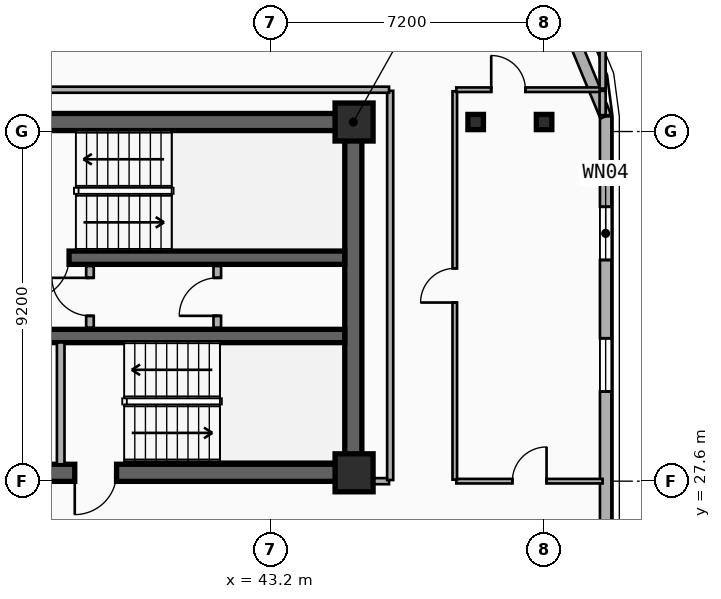
"""IFC4 building model, lengths in metres.
Left out: names, types, materials, properties, quantities, classifications, styles, units other than length and angle.
Written with IfcOpenShell. Run it as: python <this file> out.ifc"""

import sys

from ifc_helpers import new_model, si_unit, direction, frame, frame_2d, origin, origin_2d, place, context, subcontext, project, spatial, rectangle, i_section, extrude, element, fill, save


model = new_model("IFC4")
c1 = context("Model", 3, precision=1e-05, world=origin(), true_north=direction((0.0, 1.0)))
c2 = subcontext(c1, "Body", "Model", "MODEL_VIEW")
j1 = project(units=[si_unit("LENGTHUNIT", "METRE"), si_unit("PLANEANGLEUNIT", "RADIAN")], contexts=[c1])
p1 = place(None, origin())
s1 = spatial("IfcSite", under=j1, at=p1, CompositionType="ELEMENT")
p2 = place(p1, origin())
s2 = spatial("IfcBuilding", under=s1, at=p2, CompositionType="ELEMENT")
p3 = place(p2, frame((0.0, 0.0, 229.2)))
s3 = spatial("IfcBuildingStorey", under=s2, at=p3, CompositionType="ELEMENT", Elevation=229.2)
p4 = place(p3, frame((12.15, 37.05, 0.0), z_axis=(0.0, 0.0, 1.0), x_axis=(1.0, 0.0, 0.0)))
e1 = element("IfcWall", 1, at=p4, inside=s3, PredefinedType="SHEAR", context=c2, shape_type="SweptSolid", body=[
    extrude(rectangle(XDim=33.23, YDim=0.45, at=frame_2d((16.615, 0.0))), origin(), (0.0, 0.0, 1.0), 3.6),
])
p5 = place(p3, frame((45.38, 27.82, 0.0), z_axis=(0.0, 0.0, 1.0), x_axis=(-1.0, 0.0, 0.0)))
e2 = element("IfcWall", 2, at=p5, inside=s3, PredefinedType="SHEAR", context=c2, shape_type="SweptSolid", body=[
    extrude(rectangle(XDim=12.23, YDim=0.45, at=frame_2d((6.115, 0.0))), origin(), (0.0, 0.0, 1.0), 3.6),
])
p6 = place(p5, frame((9.93, 0.0, 0.0)))
e3 = element("IfcOpeningElement", 3, at=p6, cuts=e2, PredefinedType="OPENING", context=c2, shape_type="SweptSolid", body=[
    extrude(rectangle(XDim=1.1, YDim=2.15, at=frame_2d((0.55, 1.075))), frame((0.0, 0.235, 0.0), z_axis=(0.0, -1.0, 0.0), x_axis=(1.0, 0.0, 0.0)), (0.0, 0.0, 1.0), 0.47),
])
p7 = place(p5, frame((6.23, 0.0, 0.0)))
e4 = element("IfcOpeningElement", 4, at=p7, cuts=e2, PredefinedType="OPENING", context=c2, shape_type="SweptSolid", body=[
    extrude(rectangle(XDim=1.1, YDim=2.15, at=frame_2d((0.55, 1.075))), frame((0.0, 0.235, 0.0), z_axis=(0.0, -1.0, 0.0), x_axis=(1.0, 0.0, 0.0)), (0.0, 0.0, 1.0), 0.47),
])
p8 = place(p3, frame((45.38, 28.045, 0.0), z_axis=(0.0, 0.0, 1.0), x_axis=(0.0, 1.0, 0.0)))
e5 = element("IfcWall", 5, at=p8, inside=s3, PredefinedType="SHEAR", context=c2, shape_type="SweptSolid", body=[
    extrude(rectangle(XDim=8.78, YDim=0.45, at=frame_2d((4.39, 0.0))), origin(), (0.0, 0.0, 1.0), 3.6),
])
p9 = place(p3, frame((45.155, 33.48, 0.0), z_axis=(0.0, 0.0, 1.0), x_axis=(-1.0, 0.0, 0.0)))
e6 = element("IfcWall", 6, at=p9, inside=s3, PredefinedType="SHEAR", context=c2, shape_type="SweptSolid", body=[
    extrude(rectangle(XDim=8.6, YDim=0.35, at=frame_2d((4.3, 0.0))), origin(), (0.0, 0.0, 1.0), 3.6),
])
p10 = place(p9, frame((7.255, 0.0, 0.0)))
e7 = element("IfcOpeningElement", 7, at=p10, cuts=e6, PredefinedType="OPENING", context=c2, shape_type="SweptSolid", body=[
    extrude(rectangle(XDim=1.1, YDim=2.15, at=frame_2d((0.55, 1.075))), frame((0.0, 0.185, 0.0), z_axis=(0.0, -1.0, 0.0), x_axis=(1.0, 0.0, 0.0)), (0.0, 0.0, 1.0), 0.37),
])
p11 = place(p3, frame((36.555, 31.42, 0.0), z_axis=(0.0, 0.0, 1.0), x_axis=(1.0, 0.0, 0.0)))
e8 = element("IfcWall", 8, at=p11, inside=s3, PredefinedType="SHEAR", context=c2, shape_type="SweptSolid", body=[
    extrude(rectangle(XDim=8.6, YDim=0.35, at=frame_2d((4.3, 0.0))), origin(), (0.0, 0.0, 1.0), 3.6),
])
for number, where, z_axis, x_axis in (
    (9, (45.4, 27.82, 0.0), (0.0, 0.0, 1.0), (1.0, 0.0, 0.0)),
    (10, (45.4, 37.05, 0.0), (0.0, 0.0, 1.0), (1.0, 0.0, 0.0)),
):
    element("IfcColumn", number, at=place(p3, frame(where, z_axis=z_axis, x_axis=x_axis)), inside=s3, PredefinedType="COLUMN", context=c2, shape_type="SweptSolid", body=[
        extrude(rectangle(XDim=1.0, YDim=1.0, at=origin_2d()), origin(), (0.0, 0.0, 1.0), 3.6),
    ])
for number, where, z_axis, x_axis in (
    (11, (48.6, 37.05, 0.0), (0.0, 0.0, 1.0), (1.0, 0.0, 0.0)),
    (12, (50.4, 37.05, 0.0), (0.0, 0.0, 1.0), (1.0, 0.0, 0.0)),
):
    element("IfcColumn", number, at=place(p3, frame(where, z_axis=z_axis, x_axis=x_axis)), inside=s3, PredefinedType="COLUMN", context=c2, shape_type="SweptSolid", body=[
        extrude(i_section(OverallWidth=0.408, OverallDepth=0.4, WebThickness=0.025, FlangeThickness=0.039, FilletRadius=0.015, at=origin_2d()), origin(), (0.0, 0.0, 1.0), 3.6),
    ])
p12 = place(p3, frame((52.02, 37.2, 0.0), z_axis=(0.0, 0.0, 1.0), x_axis=(0.0, -1.0, 0.0)))
e13 = element("IfcWall", 13, at=p12, inside=s3, PredefinedType="SOLIDWALL", context=c2, shape_type="SweptSolid", body=[
    extrude(rectangle(XDim=28.6, YDim=0.3, at=frame_2d((14.3, 0.0))), origin(), (0.0, 0.0, 1.0), 3.34),
])
p13 = place(p12, frame((2.38, 0.0, 0.34)))
e14 = element("IfcOpeningElement", 14, at=p13, cuts=e13, PredefinedType="OPENING", context=c2, shape_type="SweptSolid", body=[
    extrude(rectangle(XDim=1.4, YDim=2.1, at=frame_2d((0.7, 1.05))), frame((0.0, 0.16, 0.0), z_axis=(0.0, -1.0, 0.0), x_axis=(1.0, 0.0, 0.0)), (0.0, 0.0, 1.0), 0.32),
])
p14 = place(p12, frame((5.84, 0.0, 0.34)))
e15 = element("IfcOpeningElement", 15, at=p14, cuts=e13, PredefinedType="OPENING", context=c2, shape_type="SweptSolid", body=[
    extrude(rectangle(XDim=1.4, YDim=2.1, at=frame_2d((0.7, 1.05))), frame((0.0, 0.16, 0.0), z_axis=(0.0, -1.0, 0.0), x_axis=(1.0, 0.0, 0.0)), (0.0, 0.0, 1.0), 0.32),
])
p15 = place(p12, frame((24.529, 0.0, 0.34)))
e16 = element("IfcOpeningElement", 16, at=p15, cuts=e13, PredefinedType="OPENING", context=c2, shape_type="SweptSolid", body=[
    extrude(rectangle(XDim=1.4, YDim=2.1, at=frame_2d((0.7, 1.05))), frame((0.0, 0.16, 0.0), z_axis=(0.0, -1.0, 0.0), x_axis=(1.0, 0.0, 0.0)), (0.0, 0.0, 1.0), 0.32),
])
p16 = place(p12, frame((20.521, 0.0, 0.34)))
e17 = element("IfcOpeningElement", 17, at=p16, cuts=e13, PredefinedType="OPENING", context=c2, shape_type="SweptSolid", body=[
    extrude(rectangle(XDim=1.4, YDim=2.1, at=frame_2d((0.7, 1.05))), frame((0.0, 0.16, 0.0), z_axis=(0.0, -1.0, 0.0), x_axis=(1.0, 0.0, 0.0)), (0.0, 0.0, 1.0), 0.32),
])
p17 = place(p12, frame((16.733, 0.0, 0.34)))
e18 = element("IfcOpeningElement", 18, at=p17, cuts=e13, PredefinedType="OPENING", context=c2, shape_type="SweptSolid", body=[
    extrude(rectangle(XDim=1.4, YDim=2.1, at=frame_2d((0.7, 1.05))), frame((0.0, 0.16, 0.0), z_axis=(0.0, -1.0, 0.0), x_axis=(1.0, 0.0, 0.0)), (0.0, 0.0, 1.0), 0.32),
])
p18 = place(p12, frame((12.945, 0.0, 0.34)))
e19 = element("IfcOpeningElement", 19, at=p18, cuts=e13, PredefinedType="OPENING", context=c2, shape_type="SweptSolid", body=[
    extrude(rectangle(XDim=1.4, YDim=2.1, at=frame_2d((0.7, 1.05))), frame((0.0, 0.16, 0.0), z_axis=(0.0, -1.0, 0.0), x_axis=(1.0, 0.0, 0.0)), (0.0, 0.0, 1.0), 0.32),
])
p19 = place(p3, frame((50.843, 40.042, 0.0), z_axis=(0.0, 0.0, 1.0), x_axis=(0.382704529509, -0.923870793506, 0.0)))
e20 = element("IfcWall", 20, at=p19, inside=s3, PredefinedType="SOLIDWALL", context=c2, shape_type="SweptSolid", body=[
    extrude(rectangle(XDim=3.077, YDim=0.3, at=frame_2d((1.538, 0.0))), origin(), (0.0, 0.0, 1.0), 3.34),
])
p20 = place(p3, frame((37.68, 28.045, 0.0), z_axis=(0.0, 0.0, 1.0), x_axis=(0.0, 1.0, 0.0)))
e21 = element("IfcWall", 21, at=p20, inside=s3, PredefinedType="PARTITIONING", context=c2, shape_type="SweptSolid", body=[
    extrude(rectangle(XDim=3.205, YDim=0.2, at=frame_2d((1.603, 0.0))), origin(), (0.0, 0.0, 1.0), 2.72),
])
p21 = place(p3, frame((38.45, 31.64, 0.0), z_axis=(0.0, 0.0, 1.0), x_axis=(0.0, 1.0, 0.0)))
e22 = element("IfcWall", 22, at=p21, inside=s3, PredefinedType="PARTITIONING", context=c2, shape_type="SweptSolid", body=[
    extrude(rectangle(XDim=1.62, YDim=0.2, at=frame_2d((0.81, 0.0))), origin(), (0.0, 0.0, 1.0), 3.34),
])
p22 = place(p21, frame((0.31, 0.0, 0.0)))
e23 = element("IfcOpeningElement", 23, at=p22, cuts=e22, PredefinedType="OPENING", context=c2, shape_type="SweptSolid", body=[
    extrude(rectangle(XDim=1.0, YDim=2.15, at=frame_2d((0.5, 1.075))), frame((0.0, 0.11, 0.0), z_axis=(0.0, -1.0, 0.0), x_axis=(1.0, 0.0, 0.0)), (0.0, 0.0, 1.0), 0.22),
])
p23 = place(p3, frame((41.8, 31.64, 0.0), z_axis=(0.0, 0.0, 1.0), x_axis=(0.0, 1.0, 0.0)))
e24 = element("IfcWall", 24, at=p23, inside=s3, PredefinedType="PARTITIONING", context=c2, shape_type="SweptSolid", body=[
    extrude(rectangle(XDim=1.62, YDim=0.2, at=frame_2d((0.81, 0.0))), origin(), (0.0, 0.0, 1.0), 3.34),
])
p24 = place(p23, frame((0.31, 0.0, 0.0)))
e25 = element("IfcOpeningElement", 25, at=p24, cuts=e24, PredefinedType="OPENING", context=c2, shape_type="SweptSolid", body=[
    extrude(rectangle(XDim=1.0, YDim=2.15, at=frame_2d((0.5, 1.075))), frame((0.0, 0.11, 0.0), z_axis=(0.0, -1.0, 0.0), x_axis=(1.0, 0.0, 0.0)), (0.0, 0.0, 1.0), 0.22),
])
p25 = place(p3, frame((48.09, 27.6, 0.0), z_axis=(0.0, 0.0, 1.0), x_axis=(1.0, 0.0, 0.0)))
e26 = element("IfcWall", 26, at=p25, inside=s3, PredefinedType="PARTITIONING", context=c2, shape_type="SweptSolid", body=[
    extrude(rectangle(XDim=3.85, YDim=0.12, at=frame_2d((1.925, 0.0))), origin(), (0.0, 0.0, 1.0), 2.67),
])
p26 = place(p25, frame((1.475, 0.0, 0.0)))
e27 = element("IfcOpeningElement", 27, at=p26, cuts=e26, PredefinedType="OPENING", context=c2, shape_type="SweptSolid", body=[
    extrude(rectangle(XDim=0.9, YDim=2.1, at=frame_2d((0.45, 1.05))), frame((0.0, 0.07, 0.0), z_axis=(0.0, -1.0, 0.0), x_axis=(1.0, 0.0, 0.0)), (0.0, 0.0, 1.0), 0.14),
])
p27 = place(p3, frame((48.05, 27.64, 0.0), z_axis=(0.0, 0.0, 1.0), x_axis=(0.0, 1.0, 0.0)))
e28 = element("IfcWall", 28, at=p27, inside=s3, PredefinedType="PARTITIONING", context=c2, shape_type="SweptSolid", body=[
    extrude(rectangle(XDim=10.22, YDim=0.12, at=frame_2d((5.11, 0.0))), origin(), (0.0, 0.0, 1.0), 2.82),
])
p28 = place(p27, frame((4.66, 0.0, 0.0)))
e29 = element("IfcOpeningElement", 29, at=p28, cuts=e28, PredefinedType="OPENING", context=c2, shape_type="SweptSolid", body=[
    extrude(rectangle(XDim=0.9, YDim=2.1, at=frame_2d((0.45, 1.05))), frame((0.0, 0.07, 0.0), z_axis=(0.0, -1.0, 0.0), x_axis=(1.0, 0.0, 0.0)), (0.0, 0.0, 1.0), 0.14),
])
p29 = place(p3, frame((48.09, 37.9, 0.0), z_axis=(0.0, 0.0, 1.0), x_axis=(1.0, 0.0, 0.0)))
e30 = element("IfcWall", 30, at=p29, inside=s3, PredefinedType="PARTITIONING", context=c2, shape_type="SweptSolid", body=[
    extrude(rectangle(XDim=3.85, YDim=0.12, at=frame_2d((1.925, 0.0))), origin(), (0.0, 0.0, 1.0), 3.34),
])
p30 = place(p29, frame((0.919, 0.0, 0.0)))
e31 = element("IfcOpeningElement", 31, at=p30, cuts=e30, PredefinedType="OPENING", context=c2, shape_type="SweptSolid", body=[
    extrude(rectangle(XDim=0.9, YDim=2.1, at=frame_2d((0.45, 1.05))), frame((0.0, 0.07, 0.0), z_axis=(0.0, -1.0, 0.0), x_axis=(1.0, 0.0, 0.0)), (0.0, 0.0, 1.0), 0.14),
])
p31 = place(p3, frame((45.41, 27.6, 0.0), z_axis=(0.0, 0.0, 1.0), x_axis=(1.0, 0.0, 0.0)))
e32 = element("IfcWall", 32, at=p31, inside=s3, PredefinedType="PARTITIONING", context=c2, shape_type="SweptSolid", body=[
    extrude(rectangle(XDim=0.91, YDim=0.16, at=frame_2d((0.455, 0.0))), origin(), (0.0, 0.0, 1.0), 2.41),
])
p32 = place(p3, frame((46.35, 27.63, 0.0), z_axis=(0.0, 0.0, 1.0), x_axis=(0.0, 1.0, 0.0)))
e33 = element("IfcWall", 33, at=p32, inside=s3, PredefinedType="PARTITIONING", context=c2, shape_type="SweptSolid", body=[
    extrude(rectangle(XDim=10.24, YDim=0.16, at=frame_2d((5.12, 0.0))), origin(), (0.0, 0.0, 1.0), 2.82),
])
p33 = place(p3, frame((11.28, 37.9, 0.0), z_axis=(0.0, 0.0, 1.0), x_axis=(1.0, 0.0, 0.0)))
e34 = element("IfcWall", 34, at=p33, inside=s3, PredefinedType="PARTITIONING", context=c2, shape_type="SweptSolid", body=[
    extrude(rectangle(XDim=35.04, YDim=0.16, at=frame_2d((17.52, 0.0))), origin(), (0.0, 0.0, 1.0), 3.34),
])
p34 = place(p3, frame((51.94, 37.93, 0.0), z_axis=(0.0, 0.0, 1.0), x_axis=(0.0, 1.0, 0.0)))
e35 = element("IfcWall", 35, at=p34, inside=s3, PredefinedType="PARTITIONING", context=c2, shape_type="SweptSolid", body=[
    extrude(rectangle(XDim=1.44, YDim=0.16, at=frame_2d((0.72, 0.0))), origin(), (0.0, 0.0, 1.0), 3.34),
])
p35 = place(p3, frame((51.94, 37.23, 0.0), z_axis=(0.0, 0.0, 1.0), x_axis=(0.0, 1.0, 0.0)))
e36 = element("IfcWall", 36, at=p35, inside=s3, PredefinedType="PARTITIONING", context=c2, shape_type="SweptSolid", body=[
    extrude(rectangle(XDim=0.64, YDim=0.16, at=frame_2d((0.32, 0.0))), origin(), (0.0, 0.0, 1.0), 3.34),
])
p36 = place(p13, origin())
e37 = element("IfcWindow", 37, at=p36, inside=s3, PartitioningType="SINGLE_PANEL", PredefinedType="WINDOW", context=c2, shape_type="SweptSolid", body=[
    extrude(rectangle(XDim=1.4, YDim=2.1, at=frame_2d((0.7, 1.05))), frame((0.0, 0.03, 0.0), z_axis=(0.0, -1.0, 0.0), x_axis=(1.0, 0.0, 0.0)), (0.0, 0.0, 1.0), 0.06),
])
fill(e14, e37)
p37 = place(p14, origin())
e38 = element("IfcWindow", 38, at=p37, inside=s3, PartitioningType="SINGLE_PANEL", PredefinedType="WINDOW", context=c2, shape_type="SweptSolid", body=[
    extrude(rectangle(XDim=1.4, YDim=2.1, at=frame_2d((0.7, 1.05))), frame((0.0, 0.03, 0.0), z_axis=(0.0, -1.0, 0.0), x_axis=(1.0, 0.0, 0.0)), (0.0, 0.0, 1.0), 0.06),
])
fill(e15, e38)
p38 = place(p10, origin())
e39 = element("IfcDoor", 39, at=p38, inside=s3, OperationType="SINGLE_SWING_RIGHT", PredefinedType="DOOR", context=c2, shape_type="SweptSolid", body=[
    extrude(rectangle(XDim=1.1, YDim=2.15, at=frame_2d((0.55, 1.075))), frame((0.0, 0.025, 0.0), z_axis=(0.0, -1.0, 0.0), x_axis=(1.0, 0.0, 0.0)), (0.0, 0.0, 1.0), 0.05),
])
fill(e7, e39)
p39 = place(p7, origin())
e40 = element("IfcDoor", 40, at=p39, inside=s3, OperationType="SINGLE_SWING_RIGHT", PredefinedType="DOOR", context=c2, shape_type="SweptSolid", body=[
    extrude(rectangle(XDim=1.1, YDim=2.15, at=frame_2d((0.55, 1.075))), frame((0.0, 0.025, 0.0), z_axis=(0.0, -1.0, 0.0), x_axis=(1.0, 0.0, 0.0)), (0.0, 0.0, 1.0), 0.05),
])
fill(e4, e40)
p40 = place(p22, origin())
e41 = element("IfcDoor", 41, at=p40, inside=s3, OperationType="SINGLE_SWING_RIGHT", PredefinedType="DOOR", context=c2, shape_type="SweptSolid", body=[
    extrude(rectangle(XDim=1.0, YDim=2.15, at=frame_2d((0.5, 1.075))), frame((0.0, 0.025, 0.0), z_axis=(0.0, -1.0, 0.0), x_axis=(1.0, 0.0, 0.0)), (0.0, 0.0, 1.0), 0.05),
])
fill(e23, e41)
p41 = place(p24, origin())
e42 = element("IfcDoor", 42, at=p41, inside=s3, OperationType="SINGLE_SWING_LEFT", PredefinedType="DOOR", context=c2, shape_type="SweptSolid", body=[
    extrude(rectangle(XDim=1.0, YDim=2.15, at=frame_2d((0.5, 1.075))), frame((0.0, 0.025, 0.0), z_axis=(0.0, -1.0, 0.0), x_axis=(1.0, 0.0, 0.0)), (0.0, 0.0, 1.0), 0.05),
])
fill(e25, e42)
p42 = place(p26, origin())
e43 = element("IfcDoor", 43, at=p42, inside=s3, OperationType="SINGLE_SWING_RIGHT", PredefinedType="DOOR", context=c2, shape_type="SweptSolid", body=[
    extrude(rectangle(XDim=0.9, YDim=2.1, at=frame_2d((0.45, 1.05))), frame((0.0, 0.025, 0.0), z_axis=(0.0, -1.0, 0.0), x_axis=(1.0, 0.0, 0.0)), (0.0, 0.0, 1.0), 0.05),
])
fill(e27, e43)
p43 = place(p28, origin())
e44 = element("IfcDoor", 44, at=p43, inside=s3, OperationType="SINGLE_SWING_LEFT", PredefinedType="DOOR", context=c2, shape_type="SweptSolid", body=[
    extrude(rectangle(XDim=0.9, YDim=2.1, at=frame_2d((0.45, 1.05))), frame((0.0, 0.025, 0.0), z_axis=(0.0, -1.0, 0.0), x_axis=(1.0, 0.0, 0.0)), (0.0, 0.0, 1.0), 0.05),
])
fill(e29, e44)
p44 = place(p30, origin())
e45 = element("IfcDoor", 45, at=p44, inside=s3, OperationType="SINGLE_SWING_LEFT", PredefinedType="DOOR", context=c2, shape_type="SweptSolid", body=[
    extrude(rectangle(XDim=0.9, YDim=2.1, at=frame_2d((0.45, 1.05))), frame((0.0, 0.025, 0.0), z_axis=(0.0, -1.0, 0.0), x_axis=(1.0, 0.0, 0.0)), (0.0, 0.0, 1.0), 0.05),
])
fill(e31, e45)
save(model, sys.argv[1])
